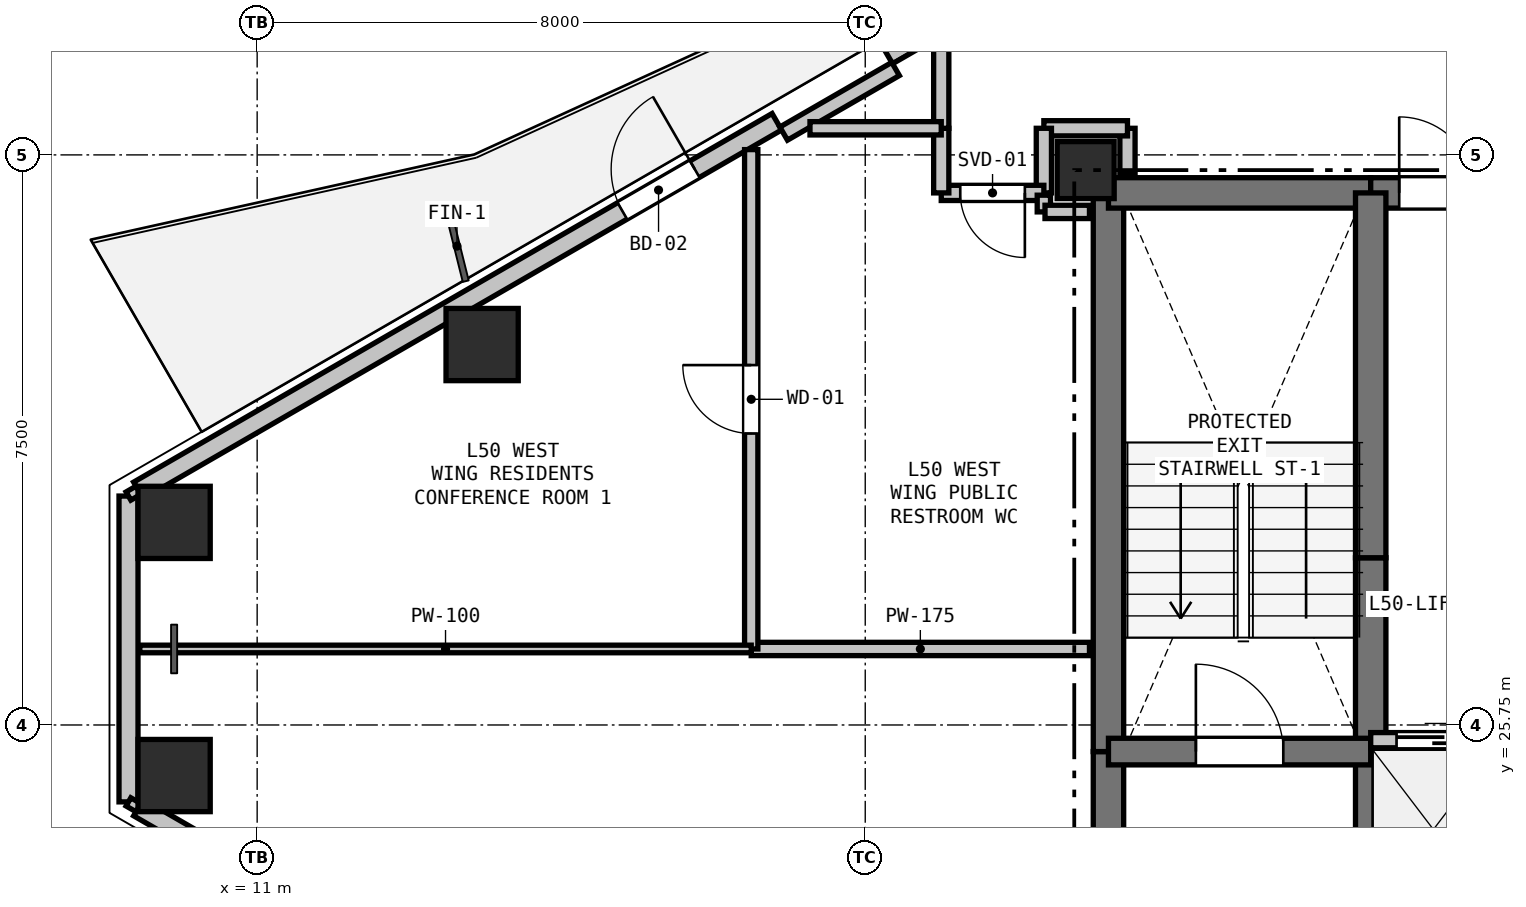
"""IFC4 building model, lengths in metres.
Left out: names, types, materials, properties, quantities, classifications, styles, units other than length and angle.
Written with IfcOpenShell. Run it as: python <this file> out.ifc"""

import sys

from ifc_helpers import new_model, si_unit, direction, frame, frame_2d, origin, origin_2d, place, context, subcontext, project, spatial, rectangle, hollow_rectangle, extrude, element, fill, save


model = new_model("IFC4")
c1 = context("Model", 3, precision=1e-05, world=origin(), true_north=direction((0.0, 1.0)))
c2 = subcontext(c1, "Body", "Model", "MODEL_VIEW")
j1 = project(units=[si_unit("LENGTHUNIT", "METRE"), si_unit("PLANEANGLEUNIT", "RADIAN")], contexts=[c1])
p1 = place(None, origin())
s1 = spatial("IfcSite", under=j1, at=p1, CompositionType="ELEMENT")
p2 = place(p1, origin())
s2 = spatial("IfcBuilding", under=s1, at=p2, CompositionType="ELEMENT")
p3 = place(p2, frame((0.0, 0.0, 182.1)))
s3 = spatial("IfcBuildingStorey", under=s2, at=p3, CompositionType="ELEMENT", Elevation=182.1)
p4 = place(p3, frame((21.9, 33.05, 0.0), z_axis=(0.0, 0.0, 1.0), x_axis=(1.0, 0.0, 0.0)))
e1 = element("IfcColumn", 1, at=p4, inside=s3, PredefinedType="COLUMN", context=c2, shape_type="SweptSolid", body=[
    extrude(rectangle(XDim=0.75, YDim=0.75, at=origin_2d()), origin(), (0.0, 0.0, 1.0), 3.3),
])
for number, where, z_axis, x_axis in (
    (2, (9.907, 28.415, 0.0), (0.0, 0.0, 1.0), (1.0, 0.0, 0.0)),
    (3, (13.96, 30.755, 0.0), (0.0, 0.0, 1.0), (1.0, 0.0, 0.0)),
    (4, (9.907, 25.085, 0.0), (0.0, 0.0, 1.0), (1.0, 0.0, 0.0)),
):
    element("IfcColumn", number, at=place(p3, frame(where, z_axis=z_axis, x_axis=x_axis)), inside=s3, PredefinedType="COLUMN", context=c2, shape_type="SweptSolid", body=[
        extrude(hollow_rectangle(XDim=0.95, YDim=0.95, WallThickness=0.028, at=origin_2d()), origin(), (0.0, 0.0, 1.0), 3.3),
    ])
p5 = place(p3, frame((9.308, 24.738, 0.0), z_axis=(0.0, 0.0, 1.0), x_axis=(0.0, 1.0, 0.0)))
e5 = element("IfcWall", 5, at=p5, inside=s3, PredefinedType="SOLIDWALL", context=c2, shape_type="SweptSolid", body=[
    extrude(rectangle(XDim=4.023, YDim=0.25, at=frame_2d((2.012, 0.0))), origin(), (0.0, 0.0, 1.0), 2.69),
])
p6 = place(p3, frame((9.438, 28.837, 0.0), z_axis=(0.0, 0.0, 1.0), x_axis=(0.866027133173, 0.499997004599, 0.0)))
e6 = element("IfcWall", 6, at=p6, inside=s3, PredefinedType="SOLIDWALL", context=c2, shape_type="SweptSolid", body=[
    extrude(rectangle(XDim=9.699, YDim=0.25, at=frame_2d((4.849, 0.0))), origin(), (0.0, 0.0, 1.0), 2.69),
])
p7 = place(p6, frame((7.352, 0.0, 0.0)))
e7 = element("IfcOpeningElement", 7, at=p7, cuts=e6, PredefinedType="OPENING", context=c2, shape_type="SweptSolid", body=[
    extrude(rectangle(XDim=1.1, YDim=2.1, at=frame_2d((0.55, 1.05))), frame((0.0, 0.135, 0.0), z_axis=(0.0, -1.0, 0.0), x_axis=(1.0, 0.0, 0.0)), (0.0, 0.0, 1.0), 0.27),
])
p8 = place(p3, frame((19.309, 34.536, 0.0), z_axis=(0.0, 0.0, 1.0), x_axis=(0.866020680503, 0.500008180874, 0.0)))
e8 = element("IfcWall", 8, at=p8, inside=s3, PredefinedType="PARAPET", context=c2, shape_type="SweptSolid", body=[
    extrude(rectangle(XDim=8.999, YDim=0.2, at=frame_2d((4.5, 0.0))), origin(), (0.0, 0.0, 1.0), 0.2),
])
p9 = place(p3, frame((17.927, 33.53, 0.0), z_axis=(0.0, 0.0, 1.0), x_axis=(0.86605165483, 0.499954529098, 0.0)))
e9 = element("IfcWall", 9, at=p9, inside=s3, PredefinedType="PARAPET", context=c2, shape_type="SweptSolid", body=[
    extrude(rectangle(XDim=1.7, YDim=0.2, at=frame_2d((0.85, 0.0))), origin(), (0.0, 0.0, 1.0), 2.69),
])
p10 = place(p3, frame((17.837, 19.814, 0.0), z_axis=(0.0, 0.0, 1.0), x_axis=(-0.866027133173, 0.499997004599, 0.0)))
e10 = element("IfcWall", 10, at=p10, inside=s3, PredefinedType="SOLIDWALL", context=c2, shape_type="SweptSolid", body=[
    extrude(rectangle(XDim=9.699, YDim=0.25, at=frame_2d((4.849, 0.0))), origin(), (0.0, 0.0, 1.0), 2.69),
])
p11 = place(p3, frame((22.2, 20.75, 0.0), z_axis=(0.0, 0.0, 1.0), x_axis=(0.0, 1.0, 0.0)))
e11 = element("IfcWall", 11, at=p11, inside=s3, PredefinedType="SHEAR", context=c2, shape_type="SweptSolid", body=[
    extrude(rectangle(XDim=4.65, YDim=0.4, at=frame_2d((2.325, 0.0))), origin(), (0.0, 0.0, 1.0), 3.07),
])
p12 = place(p3, frame((22.2, 25.4, 0.0), z_axis=(0.0, 0.0, 1.0), x_axis=(0.0, 1.0, 0.0)))
e12 = element("IfcWall", 12, at=p12, inside=s3, PredefinedType="SHEAR", context=c2, shape_type="SweptSolid", body=[
    extrude(rectangle(XDim=7.35, YDim=0.4, at=frame_2d((3.675, 0.0))), origin(), (0.0, 0.0, 1.0), 3.07),
])
p13 = place(p3, frame((22.2, 32.75, 0.0), z_axis=(0.0, 0.0, 1.0), x_axis=(1.0, 0.0, 0.0)))
e13 = element("IfcWall", 13, at=p13, inside=s3, PredefinedType="SHEAR", context=c2, shape_type="SweptSolid", body=[
    extrude(rectangle(XDim=3.45, YDim=0.4, at=frame_2d((1.725, 0.0))), origin(), (0.0, 0.0, 1.0), 3.07),
])
p14 = place(p3, frame((25.65, 32.75, 0.0), z_axis=(0.0, 0.0, 1.0), x_axis=(1.0, 0.0, 0.0)))
e14 = element("IfcWall", 14, at=p14, inside=s3, PredefinedType="SHEAR", context=c2, shape_type="SweptSolid", body=[
    extrude(rectangle(XDim=1.75, YDim=0.4, at=frame_2d((0.875, 0.0))), origin(), (0.0, 0.0, 1.0), 3.07),
])
p15 = place(p14, frame((0.375, 0.0, 0.0)))
e15 = element("IfcOpeningElement", 15, at=p15, cuts=e14, PredefinedType="OPENING", context=c2, shape_type="SweptSolid", body=[
    extrude(rectangle(XDim=1.0, YDim=2.15, at=frame_2d((0.5, 1.075))), frame((0.0, 0.21, 0.0), z_axis=(0.0, -1.0, 0.0), x_axis=(1.0, 0.0, 0.0)), (0.0, 0.0, 1.0), 0.42),
])
p16 = place(p3, frame((25.65, 22.75, 0.0), z_axis=(0.0, 0.0, 1.0), x_axis=(0.0, 1.0, 0.0)))
e16 = element("IfcWall", 16, at=p16, inside=s3, PredefinedType="SHEAR", context=c2, shape_type="SweptSolid", body=[
    extrude(rectangle(XDim=2.8, YDim=0.4, at=frame_2d((1.4, 0.0))), origin(), (0.0, 0.0, 1.0), 3.07),
])
p17 = place(p3, frame((25.65, 25.55, 0.0), z_axis=(0.0, 0.0, 1.0), x_axis=(0.0, 1.0, 0.0)))
e17 = element("IfcWall", 17, at=p17, inside=s3, PredefinedType="SHEAR", context=c2, shape_type="SweptSolid", body=[
    extrude(rectangle(XDim=2.4, YDim=0.4, at=frame_2d((1.2, 0.0))), origin(), (0.0, 0.0, 1.0), 3.07),
])
p18 = place(p3, frame((25.65, 27.95, 0.0), z_axis=(0.0, 0.0, 1.0), x_axis=(0.0, 1.0, 0.0)))
e18 = element("IfcWall", 18, at=p18, inside=s3, PredefinedType="SHEAR", context=c2, shape_type="SweptSolid", body=[
    extrude(rectangle(XDim=4.8, YDim=0.4, at=frame_2d((2.4, 0.0))), origin(), (0.0, 0.0, 1.0), 3.07),
])
p19 = place(p3, frame((22.2, 25.4, 0.0), z_axis=(0.0, 0.0, 1.0), x_axis=(1.0, 0.0, 0.0)))
e19 = element("IfcWall", 19, at=p19, inside=s3, PredefinedType="SHEAR", context=c2, shape_type="SweptSolid", body=[
    extrude(rectangle(XDim=3.45, YDim=0.35, at=frame_2d((1.725, 0.0))), origin(), (0.0, 0.0, 1.0), 3.07),
])
p20 = place(p19, frame((1.15, 0.0, 0.0)))
e20 = element("IfcOpeningElement", 20, at=p20, cuts=e19, PredefinedType="OPENING", context=c2, shape_type="SweptSolid", body=[
    extrude(rectangle(XDim=1.15, YDim=2.15, at=frame_2d((0.575, 1.075))), frame((0.0, 0.185, 0.0), z_axis=(0.0, -1.0, 0.0), x_axis=(1.0, 0.0, 0.0)), (0.0, 0.0, 1.0), 0.37),
])
p21 = place(p3, frame((25.65, 25.55, 0.0), z_axis=(0.0, 0.0, 1.0), x_axis=(1.0, 0.0, 0.0)))
e21 = element("IfcWall", 21, at=p21, inside=s3, PredefinedType="PARTITIONING", context=c2, shape_type="SweptSolid", body=[
    extrude(rectangle(XDim=4.95, YDim=0.2, at=frame_2d((2.475, 0.0))), origin(), (0.0, 0.0, 1.0), 3.07),
])
p22 = place(p21, frame((0.34, 0.0, 0.0)))
e22 = element("IfcOpeningElement", 22, at=p22, cuts=e21, PredefinedType="OPENING", context=c2, shape_type="SweptSolid", body=[
    extrude(rectangle(XDim=1.1, YDim=2.15, at=frame_2d((0.55, 1.075))), frame((0.0, 0.11, 0.0), z_axis=(0.0, -1.0, 0.0), x_axis=(1.0, 0.0, 0.0)), (0.0, 0.0, 1.0), 0.22),
])
p23 = place(p21, frame((1.99, 0.0, 0.0)))
e23 = element("IfcOpeningElement", 23, at=p23, cuts=e21, PredefinedType="OPENING", context=c2, shape_type="SweptSolid", body=[
    extrude(rectangle(XDim=1.1, YDim=2.15, at=frame_2d((0.55, 1.075))), frame((0.0, 0.11, 0.0), z_axis=(0.0, -1.0, 0.0), x_axis=(1.0, 0.0, 0.0)), (0.0, 0.0, 1.0), 0.22),
])
p24 = place(p21, frame((3.64, 0.0, 0.0)))
e24 = element("IfcOpeningElement", 24, at=p24, cuts=e21, PredefinedType="OPENING", context=c2, shape_type="SweptSolid", body=[
    extrude(rectangle(XDim=1.1, YDim=2.15, at=frame_2d((0.55, 1.075))), frame((0.0, 0.11, 0.0), z_axis=(0.0, -1.0, 0.0), x_axis=(1.0, 0.0, 0.0)), (0.0, 0.0, 1.0), 0.22),
])
p25 = place(p3, frame((22.45, 33.0, 0.0), z_axis=(0.0, 0.0, 1.0), x_axis=(0.0, 1.0, 0.0)))
e25 = element("IfcWall", 25, at=p25, inside=s3, PredefinedType="PARTITIONING", context=c2, shape_type="SweptSolid", body=[
    extrude(rectangle(XDim=0.6, YDim=0.2, at=frame_2d((0.3, 0.0))), origin(), (0.0, 0.0, 1.0), 2.595),
])
p26 = place(p3, frame((22.45, 33.6, 0.0), z_axis=(0.0, 0.0, 1.0), x_axis=(-1.0, 0.0, 0.0)))
e26 = element("IfcWall", 26, at=p26, inside=s3, PredefinedType="PARTITIONING", context=c2, shape_type="SweptSolid", body=[
    extrude(rectangle(XDim=1.1, YDim=0.2, at=frame_2d((0.55, 0.0))), origin(), (0.0, 0.0, 1.0), 3.07),
])
p27 = place(p3, frame((21.35, 33.6, 0.0), z_axis=(0.0, 0.0, 1.0), x_axis=(0.0, -1.0, 0.0)))
e27 = element("IfcWall", 27, at=p27, inside=s3, PredefinedType="PARTITIONING", context=c2, shape_type="SweptSolid", body=[
    extrude(rectangle(XDim=0.85, YDim=0.2, at=frame_2d((0.425, 0.0))), origin(), (0.0, 0.0, 1.0), 2.518),
])
p28 = place(p3, frame((21.35, 32.75, 0.0), z_axis=(0.0, 0.0, 1.0), x_axis=(-1.0, 0.0, 0.0)))
e28 = element("IfcWall", 28, at=p28, inside=s3, PredefinedType="PARTITIONING", context=c2, shape_type="SweptSolid", body=[
    extrude(rectangle(XDim=1.35, YDim=0.2, at=frame_2d((0.675, 0.0))), origin(), (0.0, 0.0, 1.0), 2.518),
])
p29 = place(p28, frame((0.25, 0.0, 0.0)))
e29 = element("IfcOpeningElement", 29, at=p29, cuts=e28, PredefinedType="OPENING", context=c2, shape_type="SweptSolid", body=[
    extrude(rectangle(XDim=0.85, YDim=2.1, at=frame_2d((0.425, 1.05))), frame((0.0, 0.11, 0.0), z_axis=(0.0, -1.0, 0.0), x_axis=(1.0, 0.0, 0.0)), (0.0, 0.0, 1.0), 0.22),
])
p30 = place(p3, frame((20.0, 32.75, 0.0), z_axis=(0.0, 0.0, 1.0), x_axis=(0.0, 1.0, 0.0)))
e30 = element("IfcWall", 30, at=p30, inside=s3, PredefinedType="PARTITIONING", context=c2, shape_type="SweptSolid", body=[
    extrude(rectangle(XDim=0.85, YDim=0.2, at=frame_2d((0.425, 0.0))), origin(), (0.0, 0.0, 1.0), 3.07),
])
p31 = place(p3, frame((20.0, 33.6, 0.0), z_axis=(0.0, 0.0, 1.0), x_axis=(0.0, 1.0, 0.0)))
e31 = element("IfcWall", 31, at=p31, inside=s3, PredefinedType="PARTITIONING", context=c2, shape_type="SweptSolid", body=[
    extrude(rectangle(XDim=1.291, YDim=0.2, at=frame_2d((0.646, 0.0))), origin(), (0.0, 0.0, 1.0), 2.365),
])
p32 = place(p3, frame((21.35, 32.72, 0.0), z_axis=(0.0, 0.0, 1.0), x_axis=(0.0, -1.0, 0.0)))
e32 = element("IfcWall", 32, at=p32, inside=s3, PredefinedType="PLUMBINGWALL", context=c2, shape_type="SweptSolid", body=[
    extrude(rectangle(XDim=0.22, YDim=0.175, at=frame_2d((0.11, 0.0))), origin(), (0.0, 0.0, 1.0), 3.07),
])
p33 = place(p3, frame((21.365, 32.5, 0.0), z_axis=(0.0, 0.0, 1.0), x_axis=(1.0, 0.0, 0.0)))
e33 = element("IfcWall", 33, at=p33, inside=s3, PredefinedType="PLUMBINGWALL", context=c2, shape_type="SweptSolid", body=[
    extrude(rectangle(XDim=0.585, YDim=0.175, at=frame_2d((0.292, 0.0))), origin(), (0.0, 0.0, 1.0), 2.595),
])
p34 = place(p3, frame((21.95, 26.75, 0.0), z_axis=(0.0, 0.0, 1.0), x_axis=(-1.0, 0.0, 0.0)))
e34 = element("IfcWall", 34, at=p34, inside=s3, PredefinedType="PLUMBINGWALL", context=c2, shape_type="SweptSolid", body=[
    extrude(rectangle(XDim=4.45, YDim=0.175, at=frame_2d((2.225, 0.0))), origin(), (0.0, 0.0, 1.0), 2.595),
])
p35 = place(p3, frame((17.5, 26.75, 0.0), z_axis=(0.0, 0.0, 1.0), x_axis=(0.0, 1.0, 0.0)))
e35 = element("IfcWall", 35, at=p35, inside=s3, PredefinedType="PLUMBINGWALL", context=c2, shape_type="SweptSolid", body=[
    extrude(rectangle(XDim=6.57, YDim=0.175, at=frame_2d((3.285, 0.0))), origin(), (0.0, 0.0, 1.0), 2.365),
])
p36 = place(p35, frame((2.835, 0.0, 0.0)))
e36 = element("IfcOpeningElement", 36, at=p36, cuts=e35, PredefinedType="OPENING", context=c2, shape_type="SweptSolid", body=[
    extrude(rectangle(XDim=0.9, YDim=2.1, at=frame_2d((0.45, 1.05))), frame((0.0, 0.097, 0.0), z_axis=(0.0, -1.0, 0.0), x_axis=(1.0, 0.0, 0.0)), (0.0, 0.0, 1.0), 0.195),
])
p37 = place(p3, frame((18.273, 33.6, 0.0), z_axis=(0.0, 0.0, 1.0), x_axis=(1.0, 0.0, 0.0)))
e37 = element("IfcWall", 37, at=p37, inside=s3, PredefinedType="PLUMBINGWALL", context=c2, shape_type="SweptSolid", body=[
    extrude(rectangle(XDim=1.727, YDim=0.175, at=frame_2d((0.863, 0.0))), origin(), (0.0, 0.0, 1.0), 2.365),
])
p38 = place(p3, frame((17.5, 26.75, 0.0), z_axis=(0.0, 0.0, 1.0), x_axis=(-1.0, 0.0, 0.0)))
e38 = element("IfcWall", 38, at=p38, inside=s3, PredefinedType="PARTITIONING", context=c2, shape_type="SweptSolid", body=[
    extrude(rectangle(XDim=8.043, YDim=0.1, at=frame_2d((4.022, 0.0))), origin(), (0.0, 0.0, 1.0), 2.734),
])
for number, where, z_axis, x_axis in (
    (39, (9.307, 28.762, 0.0), (0.0, 0.0, 1.0), (0.866, 0.5, 0.0)),
    (40, (9.437, 24.663, 0.0), (0.0, 0.0, 1.0), (-0.866, 0.5, 0.0)),
):
    element("IfcWall", number, at=place(p3, frame(where, z_axis=z_axis, x_axis=x_axis)), inside=s3, PredefinedType="PARTITIONING", context=c2, shape_type="SweptSolid", body=[
        extrude(rectangle(XDim=0.15, YDim=0.125, at=frame_2d((0.075, 0.0))), origin(), (0.0, 0.0, 1.0), 3.07),
    ])
p39 = place(p7, origin())
e41 = element("IfcDoor", 41, at=p39, inside=s3, OperationType="SINGLE_SWING_RIGHT", PredefinedType="DOOR", context=c2, shape_type="SweptSolid", body=[
    extrude(rectangle(XDim=1.1, YDim=2.1, at=frame_2d((0.55, 1.05))), frame((0.0, 0.025, 0.0), z_axis=(0.0, -1.0, 0.0), x_axis=(1.0, 0.0, 0.0)), (0.0, 0.0, 1.0), 0.05),
])
fill(e7, e41)
p40 = place(p22, origin())
e42 = element("IfcDoor", 42, at=p40, inside=s3, OperationType="SLIDING_TO_LEFT", PredefinedType="DOOR", context=c2, shape_type="SweptSolid", body=[
    extrude(rectangle(XDim=1.1, YDim=2.15, at=frame_2d((0.55, 1.075))), frame((0.0, 0.025, 0.0), z_axis=(0.0, -1.0, 0.0), x_axis=(1.0, 0.0, 0.0)), (0.0, 0.0, 1.0), 0.05),
])
fill(e22, e42)
p41 = place(p15, origin())
e43 = element("IfcDoor", 43, at=p41, inside=s3, OperationType="SINGLE_SWING_LEFT", PredefinedType="DOOR", context=c2, shape_type="SweptSolid", body=[
    extrude(rectangle(XDim=1.0, YDim=2.15, at=frame_2d((0.5, 1.075))), frame((0.0, 0.025, 0.0), z_axis=(0.0, -1.0, 0.0), x_axis=(1.0, 0.0, 0.0)), (0.0, 0.0, 1.0), 0.05),
])
fill(e15, e43)
p42 = place(p20, origin())
e44 = element("IfcDoor", 44, at=p42, inside=s3, OperationType="SINGLE_SWING_LEFT", PredefinedType="DOOR", context=c2, shape_type="SweptSolid", body=[
    extrude(rectangle(XDim=1.15, YDim=2.15, at=frame_2d((0.575, 1.075))), frame((0.0, 0.025, 0.0), z_axis=(0.0, -1.0, 0.0), x_axis=(1.0, 0.0, 0.0)), (0.0, 0.0, 1.0), 0.05),
])
fill(e20, e44)
p43 = place(p29, origin())
e45 = element("IfcDoor", 45, at=p43, inside=s3, OperationType="SINGLE_SWING_LEFT", PredefinedType="DOOR", context=c2, shape_type="SweptSolid", body=[
    extrude(rectangle(XDim=0.85, YDim=2.1, at=frame_2d((0.425, 1.05))), frame((0.0, 0.025, 0.0), z_axis=(0.0, -1.0, 0.0), x_axis=(1.0, 0.0, 0.0)), (0.0, 0.0, 1.0), 0.05),
])
fill(e29, e45)
p44 = place(p36, origin())
e46 = element("IfcDoor", 46, at=p44, inside=s3, OperationType="SINGLE_SWING_RIGHT", PredefinedType="DOOR", context=c2, shape_type="SweptSolid", body=[
    extrude(rectangle(XDim=0.9, YDim=2.1, at=frame_2d((0.45, 1.05))), frame((0.0, 0.025, 0.0), z_axis=(0.0, -1.0, 0.0), x_axis=(1.0, 0.0, 0.0)), (0.0, 0.0, 1.0), 0.05),
])
fill(e36, e46)
save(model, sys.argv[1])
